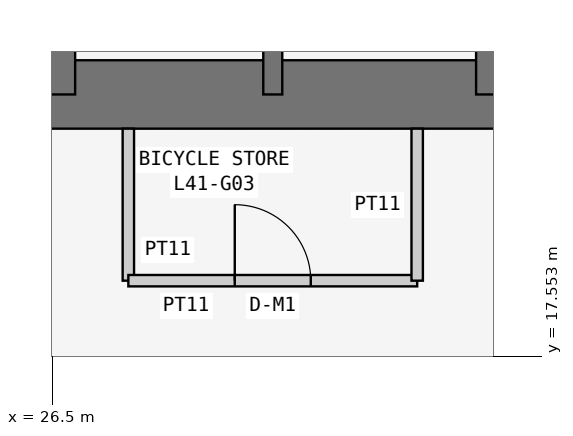
"""IFC4 building model, lengths in metres.
Left out: names, types, materials, properties, quantities, classifications, styles, units other than length and angle.
Written with IfcOpenShell. Run it as: python <this file> out.ifc"""

import sys

from ifc_helpers import new_model, si_unit, direction, frame, frame_2d, origin, place, context, subcontext, project, spatial, rectangle, extrude, element, fill, save


model = new_model("IFC4")
c1 = context("Model", 3, precision=1e-05, world=origin(), true_north=direction((0.0, 1.0)))
c2 = subcontext(c1, "Body", "Model", "MODEL_VIEW")
j1 = project(units=[si_unit("LENGTHUNIT", "METRE"), si_unit("PLANEANGLEUNIT", "RADIAN")], contexts=[c1])
p1 = place(None, origin())
s1 = spatial("IfcSite", under=j1, at=p1, CompositionType="ELEMENT")
p2 = place(p1, origin())
s2 = spatial("IfcBuilding", under=s1, at=p2, CompositionType="ELEMENT")
p3 = place(p2, frame((0.0, 0.0, 159.3)))
s3 = spatial("IfcBuildingStorey", under=s2, at=p3, CompositionType="ELEMENT", Elevation=159.3)
p4 = place(p3, frame((21.0, 21.0, 0.0), z_axis=(0.0, 0.0, 1.0), x_axis=(1.0, 0.0, 0.0)))
e1 = element("IfcWall", 1, at=p4, inside=s3, PredefinedType="SHEAR", context=c2, shape_type="SweptSolid", body=[
    extrude(rectangle(XDim=17.25, YDim=0.9, at=frame_2d((8.625, 0.0))), origin(), (0.0, 0.0, 1.0), 3.6),
])
p5 = place(p3, frame((26.6, 21.0, 0.0), z_axis=(0.0, 0.0, 1.0), x_axis=(0.0, 1.0, 0.0)))
e2 = element("IfcWall", 2, at=p5, inside=s3, PredefinedType="SHEAR", context=c2, shape_type="SweptSolid", body=[
    extrude(rectangle(XDim=16.8, YDim=0.4, at=frame_2d((8.4, 0.0))), origin(), (0.0, 0.0, 1.0), 3.6),
])
p6 = place(p5, frame((10.4, 0.0, 0.0)))
e3 = element("IfcOpeningElement", 3, at=p6, cuts=e2, PredefinedType="OPENING", context=c2, shape_type="SweptSolid", body=[
    extrude(rectangle(XDim=1.2, YDim=2.1, at=frame_2d((0.6, 1.05))), frame((0.0, 0.21, 0.0), z_axis=(0.0, -1.0, 0.0), x_axis=(1.0, 0.0, 0.0)), (0.0, 0.0, 1.0), 0.42),
])
for number, where, z_axis, x_axis in (
    (4, (29.4, 21.0, 0.0), (0.0, 0.0, 1.0), (0.0, 1.0, 0.0)),
    (5, (32.2, 21.0, 0.0), (0.0, 0.0, 1.0), (0.0, 1.0, 0.0)),
):
    element("IfcWall", number, at=place(p3, frame(where, z_axis=z_axis, x_axis=x_axis)), inside=s3, PredefinedType="SHEAR", context=c2, shape_type="SweptSolid", body=[
        extrude(rectangle(XDim=3.2, YDim=0.25, at=frame_2d((1.6, 0.0))), origin(), (0.0, 0.0, 1.0), 3.6),
    ])
p7 = place(p3, frame((27.5, 20.55, 0.0), z_axis=(0.0, 0.0, 1.0), x_axis=(0.0, -1.0, 0.0)))
e6 = element("IfcWall", 6, at=p7, inside=s3, PredefinedType="PARTITIONING", context=c2, shape_type="SweptSolid", body=[
    extrude(rectangle(XDim=2.0, YDim=0.15, at=frame_2d((1.0, 0.0))), origin(), (0.0, 0.0, 1.0), 3.45),
])
p8 = place(p3, frame((27.5, 18.55, 0.0), z_axis=(0.0, 0.0, 1.0), x_axis=(1.0, 0.0, 0.0)))
e7 = element("IfcWall", 7, at=p8, inside=s3, PredefinedType="PARTITIONING", context=c2, shape_type="SweptSolid", body=[
    extrude(rectangle(XDim=3.8, YDim=0.15, at=frame_2d((1.9, 0.0))), origin(), (0.0, 0.0, 1.0), 3.45),
])
p9 = place(p8, frame((1.4, 0.0, 0.0)))
e8 = element("IfcOpeningElement", 8, at=p9, cuts=e7, PredefinedType="OPENING", context=c2, shape_type="SweptSolid", body=[
    extrude(rectangle(XDim=1.0, YDim=2.1, at=frame_2d((0.5, 1.05))), frame((0.0, 0.085, 0.0), z_axis=(0.0, -1.0, 0.0), x_axis=(1.0, 0.0, 0.0)), (0.0, 0.0, 1.0), 0.17),
])
p10 = place(p3, frame((31.3, 18.55, 0.0), z_axis=(0.0, 0.0, 1.0), x_axis=(0.0, 1.0, 0.0)))
e9 = element("IfcWall", 9, at=p10, inside=s3, PredefinedType="PARTITIONING", context=c2, shape_type="SweptSolid", body=[
    extrude(rectangle(XDim=2.0, YDim=0.15, at=frame_2d((1.0, 0.0))), origin(), (0.0, 0.0, 1.0), 3.45),
])
p11 = place(p9, origin())
e10 = element("IfcDoor", 10, at=p11, inside=s3, OperationType="SINGLE_SWING_LEFT", PredefinedType="DOOR", context=c2, shape_type="SweptSolid", body=[
    extrude(rectangle(XDim=1.0, YDim=2.1, at=frame_2d((0.5, 1.05))), frame((0.0, 0.025, 0.0), z_axis=(0.0, -1.0, 0.0), x_axis=(1.0, 0.0, 0.0)), (0.0, 0.0, 1.0), 0.05),
])
fill(e8, e10)
save(model, sys.argv[1])
